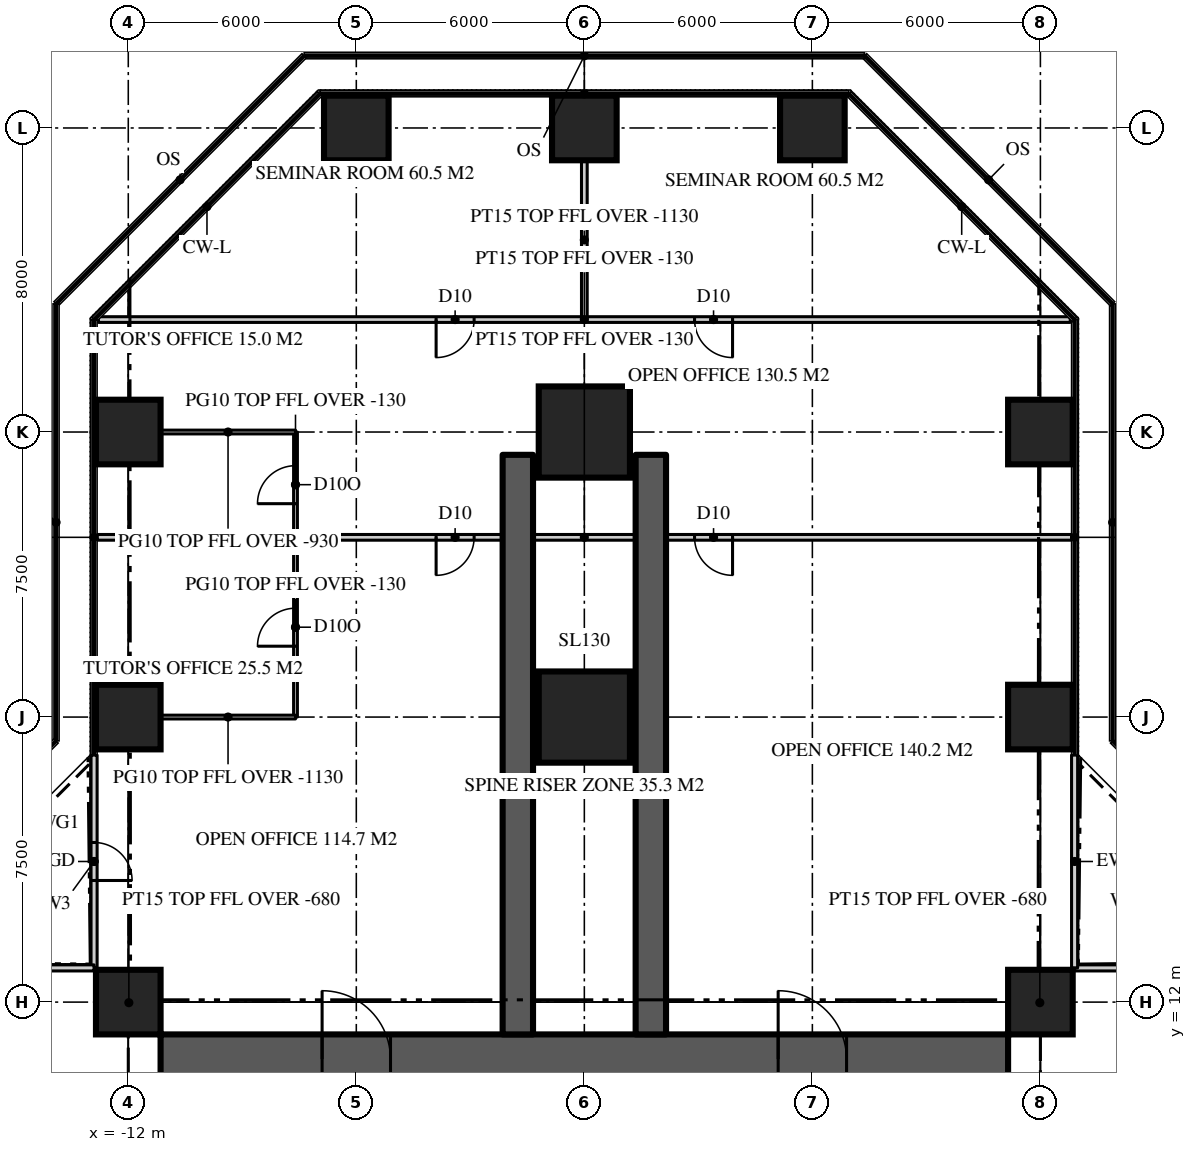
"""IFC4 building model, lengths in metres.
Left out: names, types, materials, properties, quantities, classifications, styles, units other than length and angle.
Written with IfcOpenShell. Run it as: python <this file> out.ifc"""

import sys

from ifc_helpers import new_model, si_unit, direction, frame, frame_2d, origin, origin_2d, place, context, subcontext, project, spatial, rectangle, extrude, element, fill, save


model = new_model("IFC4")
c1 = context("Model", 3, precision=1e-05, world=origin(), true_north=direction((0.0, 1.0)))
c2 = subcontext(c1, "Body", "Model", "MODEL_VIEW")
j1 = project(units=[si_unit("LENGTHUNIT", "METRE"), si_unit("PLANEANGLEUNIT", "RADIAN")], contexts=[c1])
p1 = place(None, origin())
s1 = spatial("IfcSite", under=j1, at=p1, CompositionType="ELEMENT")
p2 = place(p1, origin())
s2 = spatial("IfcBuilding", under=s1, at=p2, CompositionType="ELEMENT")
p3 = place(p2, frame((0.0, 0.0, 102.0)))
s3 = spatial("IfcBuildingStorey", under=s2, at=p3, CompositionType="ELEMENT", Elevation=102.0)
p4 = place(p3, frame((-11.15, 10.5, 0.0), z_axis=(0.0, 0.0, 1.0), x_axis=(1.0, 0.0, 0.0)))
e1 = element("IfcWall", 1, at=p4, inside=s3, PredefinedType="SHEAR", context=c2, shape_type="SweptSolid", body=[
    extrude(rectangle(XDim=22.3, YDim=1.3, at=frame_2d((11.15, 0.0))), origin(), (0.0, 0.0, 1.0), 3.9),
])
p5 = place(p4, frame((4.25, 0.0, 0.0)))
e2 = element("IfcOpeningElement", 2, at=p5, cuts=e1, PredefinedType="OPENING", context=c2, shape_type="SweptSolid", body=[
    extrude(rectangle(XDim=1.8, YDim=2.2, at=frame_2d((0.9, 1.1))), frame((0.0, 0.66, 0.0), z_axis=(0.0, -1.0, 0.0), x_axis=(1.0, 0.0, 0.0)), (0.0, 0.0, 1.0), 1.32),
])
p6 = place(p4, frame((16.25, 0.0, 0.0)))
e3 = element("IfcOpeningElement", 3, at=p6, cuts=e1, PredefinedType="OPENING", context=c2, shape_type="SweptSolid", body=[
    extrude(rectangle(XDim=1.8, YDim=2.2, at=frame_2d((0.9, 1.1))), frame((0.0, 0.66, 0.0), z_axis=(0.0, -1.0, 0.0), x_axis=(1.0, 0.0, 0.0)), (0.0, 0.0, 1.0), 1.32),
])
for number, where, z_axis, x_axis in (
    (4, (1.75, 11.15, 0.0), (0.0, 0.0, 1.0), (0.0, 1.0, 0.0)),
    (5, (-1.75, 11.15, 0.0), (0.0, 0.0, 1.0), (0.0, 1.0, 0.0)),
):
    element("IfcWall", number, at=place(p3, frame(where, z_axis=z_axis, x_axis=x_axis)), inside=s3, PredefinedType="SHEAR", context=c2, shape_type="SweptSolid", body=[
        extrude(rectangle(XDim=15.25, YDim=0.8, at=frame_2d((7.625, 0.0))), origin(), (0.0, 0.0, 1.0), 3.9),
    ])
for number, where, z_axis, x_axis in (
    (6, (-12.0, 12.0, 0.0), (0.0, 0.0, 1.0), (1.0, 0.0, 0.0)),
    (7, (12.0, 12.0, 0.0), (0.0, 0.0, 1.0), (1.0, 0.0, 0.0)),
    (8, (-12.0, 19.5, 0.0), (0.0, 0.0, 1.0), (1.0, 0.0, 0.0)),
):
    element("IfcColumn", number, at=place(p3, frame(where, z_axis=z_axis, x_axis=x_axis)), inside=s3, PredefinedType="COLUMN", context=c2, shape_type="SweptSolid", body=[
        extrude(rectangle(XDim=1.7, YDim=1.7, at=origin_2d()), origin(), (0.0, 0.0, 1.0), 3.9),
    ])
p7 = place(p3, frame((0.0, 19.5, 0.0), z_axis=(0.0, 0.0, 1.0), x_axis=(1.0, 0.0, 0.0)))
e9 = element("IfcColumn", 9, at=p7, inside=s3, PredefinedType="COLUMN", context=c2, shape_type="SweptSolid", body=[
    extrude(rectangle(XDim=2.4, YDim=2.4, at=origin_2d()), origin(), (0.0, 0.0, 1.0), 3.9),
])
for number, where, z_axis, x_axis in (
    (10, (12.0, 19.5, 0.0), (0.0, 0.0, 1.0), (1.0, 0.0, 0.0)),
    (11, (-12.0, 27.0, 0.0), (0.0, 0.0, 1.0), (1.0, 0.0, 0.0)),
):
    element("IfcColumn", number, at=place(p3, frame(where, z_axis=z_axis, x_axis=x_axis)), inside=s3, PredefinedType="COLUMN", context=c2, shape_type="SweptSolid", body=[
        extrude(rectangle(XDim=1.7, YDim=1.7, at=origin_2d()), origin(), (0.0, 0.0, 1.0), 3.9),
    ])
p8 = place(p3, frame((0.0, 27.0, 0.0), z_axis=(0.0, 0.0, 1.0), x_axis=(1.0, 0.0, 0.0)))
e12 = element("IfcColumn", 12, at=p8, inside=s3, PredefinedType="COLUMN", context=c2, shape_type="SweptSolid", body=[
    extrude(rectangle(XDim=2.4, YDim=2.4, at=origin_2d()), origin(), (0.0, 0.0, 1.0), 3.9),
])
for number, where, z_axis, x_axis in (
    (13, (12.0, 27.0, 0.0), (0.0, 0.0, 1.0), (1.0, 0.0, 0.0)),
    (14, (-6.0, 35.0, 0.0), (0.0, 0.0, 1.0), (1.0, 0.0, 0.0)),
    (15, (0.0, 35.0, 0.0), (0.0, 0.0, 1.0), (1.0, 0.0, 0.0)),
    (16, (6.0, 35.0, 0.0), (0.0, 0.0, 1.0), (1.0, 0.0, 0.0)),
):
    element("IfcColumn", number, at=place(p3, frame(where, z_axis=z_axis, x_axis=x_axis)), inside=s3, PredefinedType="COLUMN", context=c2, shape_type="SweptSolid", body=[
        extrude(rectangle(XDim=1.7, YDim=1.7, at=origin_2d()), origin(), (0.0, 0.0, 1.0), 3.9),
    ])
p9 = place(p3, frame((18.5, 12.9, 0.0), z_axis=(0.0, 0.0, 1.0), x_axis=(-1.0, 0.0, 0.0)))
e17 = element("IfcWall", 17, at=p9, inside=s3, PredefinedType="SOLIDWALL", context=c2, shape_type="SweptSolid", body=[
    extrude(rectangle(XDim=5.6, YDim=0.16, at=frame_2d((2.8, 0.0))), origin(), (0.0, 0.0, 1.0), 3.77),
])
p10 = place(p9, frame((2.3, 0.0, 0.0)))
e18 = element("IfcOpeningElement", 18, at=p10, cuts=e17, PredefinedType="OPENING", context=c2, shape_type="SweptSolid", body=[
    extrude(rectangle(XDim=1.0, YDim=2.2, at=frame_2d((0.5, 1.1))), frame((0.0, 0.09, 0.0), z_axis=(0.0, -1.0, 0.0), x_axis=(1.0, 0.0, 0.0)), (0.0, 0.0, 1.0), 0.18),
])
p11 = place(p3, frame((12.9, 12.9, 0.0), z_axis=(0.0, 0.0, 1.0), x_axis=(0.0, 1.0, 0.0)))
e19 = element("IfcWall", 19, at=p11, inside=s3, PredefinedType="SOLIDWALL", context=c2, shape_type="SweptSolid", body=[
    extrude(rectangle(XDim=5.6, YDim=0.16, at=frame_2d((2.8, 0.0))), origin(), (0.0, 0.0, 1.0), 3.77),
])
p12 = place(p3, frame((-12.9, 18.5, 0.0), z_axis=(0.0, 0.0, 1.0), x_axis=(0.0, -1.0, 0.0)))
e20 = element("IfcWall", 20, at=p12, inside=s3, PredefinedType="SOLIDWALL", context=c2, shape_type="SweptSolid", body=[
    extrude(rectangle(XDim=5.6, YDim=0.16, at=frame_2d((2.8, 0.0))), origin(), (0.0, 0.0, 1.0), 3.77),
])
p13 = place(p12, frame((2.3, 0.0, 0.0)))
e21 = element("IfcOpeningElement", 21, at=p13, cuts=e20, PredefinedType="OPENING", context=c2, shape_type="SweptSolid", body=[
    extrude(rectangle(XDim=1.0, YDim=2.2, at=frame_2d((0.5, 1.1))), frame((0.0, 0.09, 0.0), z_axis=(0.0, -1.0, 0.0), x_axis=(1.0, 0.0, 0.0)), (0.0, 0.0, 1.0), 0.18),
])
p14 = place(p3, frame((-12.9, 12.9, 0.0), z_axis=(0.0, 0.0, 1.0), x_axis=(-1.0, 0.0, 0.0)))
e22 = element("IfcWall", 22, at=p14, inside=s3, PredefinedType="SOLIDWALL", context=c2, shape_type="SweptSolid", body=[
    extrude(rectangle(XDim=5.6, YDim=0.16, at=frame_2d((2.8, 0.0))), origin(), (0.0, 0.0, 1.0), 3.77),
])
p15 = place(p3, frame((12.82, 24.229, 0.0), z_axis=(0.0, 0.0, 1.0), x_axis=(-1.0, 0.0, 0.0)))
e23 = element("IfcWall", 23, at=p15, inside=s3, PredefinedType="PARTITIONING", context=c2, shape_type="SweptSolid", body=[
    extrude(rectangle(XDim=25.64, YDim=0.15, at=frame_2d((12.82, 0.0))), origin(), (0.0, 0.0, 1.0), 3.77),
])
p16 = place(p15, frame((15.72, 0.0, 0.0)))
e24 = element("IfcOpeningElement", 24, at=p16, cuts=e23, PredefinedType="OPENING", context=c2, shape_type="SweptSolid", body=[
    extrude(rectangle(XDim=1.0, YDim=2.2, at=frame_2d((0.5, 1.1))), frame((0.0, 0.085, 0.0), z_axis=(0.0, -1.0, 0.0), x_axis=(1.0, 0.0, 0.0)), (0.0, 0.0, 1.0), 0.17),
])
p17 = place(p15, frame((8.92, 0.0, 0.0)))
e25 = element("IfcOpeningElement", 25, at=p17, cuts=e23, PredefinedType="OPENING", context=c2, shape_type="SweptSolid", body=[
    extrude(rectangle(XDim=1.0, YDim=2.2, at=frame_2d((0.5, 1.1))), frame((0.0, 0.085, 0.0), z_axis=(0.0, -1.0, 0.0), x_axis=(1.0, 0.0, 0.0)), (0.0, 0.0, 1.0), 0.17),
])
p18 = place(p3, frame((12.786, 29.959, 0.0), z_axis=(0.0, 0.0, 1.0), x_axis=(-1.0, 0.0, 0.0)))
e26 = element("IfcWall", 26, at=p18, inside=s3, PredefinedType="PARTITIONING", context=c2, shape_type="SweptSolid", body=[
    extrude(rectangle(XDim=25.573, YDim=0.15, at=frame_2d((12.786, 0.0))), origin(), (0.0, 0.0, 1.0), 3.77),
])
p19 = place(p18, frame((15.687, 0.0, 0.0)))
e27 = element("IfcOpeningElement", 27, at=p19, cuts=e26, PredefinedType="OPENING", context=c2, shape_type="SweptSolid", body=[
    extrude(rectangle(XDim=1.0, YDim=2.2, at=frame_2d((0.5, 1.1))), frame((0.0, 0.085, 0.0), z_axis=(0.0, -1.0, 0.0), x_axis=(1.0, 0.0, 0.0)), (0.0, 0.0, 1.0), 0.17),
])
p20 = place(p18, frame((8.886, 0.0, 0.0)))
e28 = element("IfcOpeningElement", 28, at=p20, cuts=e26, PredefinedType="OPENING", context=c2, shape_type="SweptSolid", body=[
    extrude(rectangle(XDim=1.0, YDim=2.2, at=frame_2d((0.5, 1.1))), frame((0.0, 0.085, 0.0), z_axis=(0.0, -1.0, 0.0), x_axis=(1.0, 0.0, 0.0)), (0.0, 0.0, 1.0), 0.17),
])
p21 = place(p3, frame((0.0, 29.959, 0.0), z_axis=(0.0, 0.0, 1.0), x_axis=(0.0, 1.0, 0.0)))
e29 = element("IfcWall", 29, at=p21, inside=s3, PredefinedType="PARTITIONING", context=c2, shape_type="SweptSolid", body=[
    extrude(rectangle(XDim=4.191, YDim=0.15, at=frame_2d((2.095, 0.0))), origin(), (0.0, 0.0, 1.0), 2.77),
])
p22 = place(p3, frame((-7.6, 19.5, 0.0), z_axis=(0.0, 0.0, 1.0), x_axis=(0.0, 1.0, 0.0)))
e30 = element("IfcWall", 30, at=p22, inside=s3, PredefinedType="PARTITIONING", context=c2, shape_type="SweptSolid", body=[
    extrude(rectangle(XDim=4.729, YDim=0.1, at=frame_2d((2.365, 0.0))), origin(), (0.0, 0.0, 1.0), 3.77),
])
p23 = place(p22, frame((1.865, 0.0, 0.0)))
e31 = element("IfcOpeningElement", 31, at=p23, cuts=e30, PredefinedType="OPENING", context=c2, shape_type="SweptSolid", body=[
    extrude(rectangle(XDim=1.0, YDim=2.2, at=frame_2d((0.5, 1.1))), frame((0.0, 0.06, 0.0), z_axis=(0.0, -1.0, 0.0), x_axis=(1.0, 0.0, 0.0)), (0.0, 0.0, 1.0), 0.12),
])
p24 = place(p3, frame((-7.6, 24.229, 0.0), z_axis=(0.0, 0.0, 1.0), x_axis=(0.0, 1.0, 0.0)))
e32 = element("IfcWall", 32, at=p24, inside=s3, PredefinedType="PARTITIONING", context=c2, shape_type="SweptSolid", body=[
    extrude(rectangle(XDim=2.771, YDim=0.1, at=frame_2d((1.385, 0.0))), origin(), (0.0, 0.0, 1.0), 3.77),
])
p25 = place(p24, frame((0.885, 0.0, 0.0)))
e33 = element("IfcOpeningElement", 33, at=p25, cuts=e32, PredefinedType="OPENING", context=c2, shape_type="SweptSolid", body=[
    extrude(rectangle(XDim=1.0, YDim=2.2, at=frame_2d((0.5, 1.1))), frame((0.0, 0.06, 0.0), z_axis=(0.0, -1.0, 0.0), x_axis=(1.0, 0.0, 0.0)), (0.0, 0.0, 1.0), 0.12),
])
p26 = place(p3, frame((-7.6, 19.5, 0.0), z_axis=(0.0, 0.0, 1.0), x_axis=(-1.0, 0.0, 0.0)))
e34 = element("IfcWall", 34, at=p26, inside=s3, PredefinedType="PARTITIONING", context=c2, shape_type="SweptSolid", body=[
    extrude(rectangle(XDim=3.55, YDim=0.1, at=frame_2d((1.775, 0.0))), origin(), (0.0, 0.0, 1.0), 2.77),
])
p27 = place(p3, frame((-7.6, 27.0, 0.0), z_axis=(0.0, 0.0, 1.0), x_axis=(-1.0, 0.0, 0.0)))
e35 = element("IfcWall", 35, at=p27, inside=s3, PredefinedType="PARTITIONING", context=c2, shape_type="SweptSolid", body=[
    extrude(rectangle(XDim=3.55, YDim=0.1, at=frame_2d((1.775, 0.0))), origin(), (0.0, 0.0, 1.0), 2.97),
])
for number, where, z_axis, x_axis in (
    (36, (11.15, 11.15, 0.0), (0.0, 0.0, 1.0), (0.707, 0.707, 0.0)),
    (37, (-11.15, 11.15, 0.0), (0.0, 0.0, 1.0), (-0.707, 0.707, 0.0)),
):
    element("IfcWall", number, at=place(p3, frame(where, z_axis=z_axis, x_axis=x_axis)), inside=s3, PredefinedType="PARTITIONING", context=c2, shape_type="SweptSolid", body=[
        extrude(rectangle(XDim=2.362, YDim=0.15, at=frame_2d((1.181, 0.0))), origin(), (0.0, 0.0, 1.0), 3.22),
    ])
p28 = place(p13, origin())
e38 = element("IfcDoor", 38, at=p28, inside=s3, OperationType="SINGLE_SWING_RIGHT", PredefinedType="DOOR", context=c2, shape_type="SweptSolid", body=[
    extrude(rectangle(XDim=1.0, YDim=2.2, at=frame_2d((0.5, 1.1))), frame((0.0, 0.025, 0.0), z_axis=(0.0, -1.0, 0.0), x_axis=(1.0, 0.0, 0.0)), (0.0, 0.0, 1.0), 0.05),
])
fill(e21, e38)
p29 = place(p5, origin())
e39 = element("IfcDoor", 39, at=p29, inside=s3, OperationType="DOUBLE_DOOR_DOUBLE_SWING", PredefinedType="DOOR", context=c2, shape_type="SweptSolid", body=[
    extrude(rectangle(XDim=1.8, YDim=2.2, at=frame_2d((0.9, 1.1))), frame((0.0, 0.025, 0.0), z_axis=(0.0, -1.0, 0.0), x_axis=(1.0, 0.0, 0.0)), (0.0, 0.0, 1.0), 0.05),
])
fill(e2, e39)
p30 = place(p6, origin())
e40 = element("IfcDoor", 40, at=p30, inside=s3, OperationType="DOUBLE_DOOR_DOUBLE_SWING", PredefinedType="DOOR", context=c2, shape_type="SweptSolid", body=[
    extrude(rectangle(XDim=1.8, YDim=2.2, at=frame_2d((0.9, 1.1))), frame((0.0, 0.025, 0.0), z_axis=(0.0, -1.0, 0.0), x_axis=(1.0, 0.0, 0.0)), (0.0, 0.0, 1.0), 0.05),
])
fill(e3, e40)
p31 = place(p16, origin())
e41 = element("IfcDoor", 41, at=p31, inside=s3, OperationType="SINGLE_SWING_RIGHT", PredefinedType="DOOR", context=c2, shape_type="SweptSolid", body=[
    extrude(rectangle(XDim=1.0, YDim=2.2, at=frame_2d((0.5, 1.1))), frame((0.0, 0.025, 0.0), z_axis=(0.0, -1.0, 0.0), x_axis=(1.0, 0.0, 0.0)), (0.0, 0.0, 1.0), 0.05),
])
fill(e24, e41)
p32 = place(p17, origin())
e42 = element("IfcDoor", 42, at=p32, inside=s3, OperationType="SINGLE_SWING_LEFT", PredefinedType="DOOR", context=c2, shape_type="SweptSolid", body=[
    extrude(rectangle(XDim=1.0, YDim=2.2, at=frame_2d((0.5, 1.1))), frame((0.0, 0.025, 0.0), z_axis=(0.0, -1.0, 0.0), x_axis=(1.0, 0.0, 0.0)), (0.0, 0.0, 1.0), 0.05),
])
fill(e25, e42)
p33 = place(p19, origin())
e43 = element("IfcDoor", 43, at=p33, inside=s3, OperationType="SINGLE_SWING_RIGHT", PredefinedType="DOOR", context=c2, shape_type="SweptSolid", body=[
    extrude(rectangle(XDim=1.0, YDim=2.2, at=frame_2d((0.5, 1.1))), frame((0.0, 0.025, 0.0), z_axis=(0.0, -1.0, 0.0), x_axis=(1.0, 0.0, 0.0)), (0.0, 0.0, 1.0), 0.05),
])
fill(e27, e43)
p34 = place(p20, origin())
e44 = element("IfcDoor", 44, at=p34, inside=s3, OperationType="SINGLE_SWING_LEFT", PredefinedType="DOOR", context=c2, shape_type="SweptSolid", body=[
    extrude(rectangle(XDim=1.0, YDim=2.2, at=frame_2d((0.5, 1.1))), frame((0.0, 0.025, 0.0), z_axis=(0.0, -1.0, 0.0), x_axis=(1.0, 0.0, 0.0)), (0.0, 0.0, 1.0), 0.05),
])
fill(e28, e44)
p35 = place(p23, origin())
e45 = element("IfcDoor", 45, at=p35, inside=s3, OperationType="SINGLE_SWING_LEFT", PredefinedType="DOOR", context=c2, shape_type="SweptSolid", body=[
    extrude(rectangle(XDim=1.0, YDim=2.2, at=frame_2d((0.5, 1.1))), frame((0.0, 0.025, 0.0), z_axis=(0.0, -1.0, 0.0), x_axis=(1.0, 0.0, 0.0)), (0.0, 0.0, 1.0), 0.05),
])
fill(e31, e45)
p36 = place(p25, origin())
e46 = element("IfcDoor", 46, at=p36, inside=s3, OperationType="SINGLE_SWING_LEFT", PredefinedType="DOOR", context=c2, shape_type="SweptSolid", body=[
    extrude(rectangle(XDim=1.0, YDim=2.2, at=frame_2d((0.5, 1.1))), frame((0.0, 0.025, 0.0), z_axis=(0.0, -1.0, 0.0), x_axis=(1.0, 0.0, 0.0)), (0.0, 0.0, 1.0), 0.05),
])
fill(e33, e46)
save(model, sys.argv[1])
